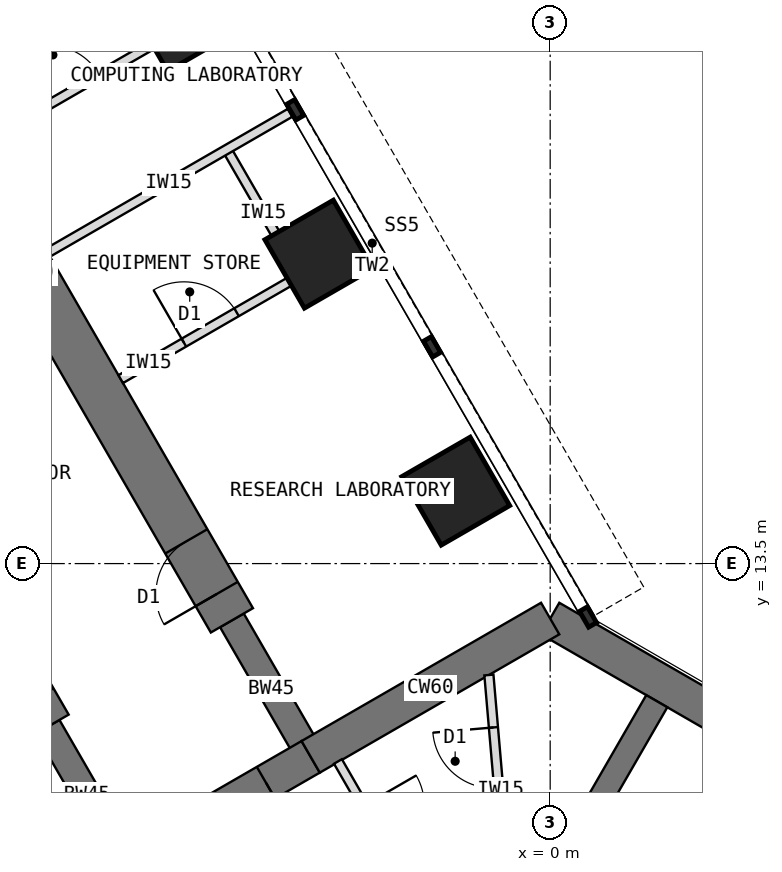
"""IFC4 building model, lengths in metres.
Left out: names, types, materials, properties, quantities, classifications, styles, units other than length and angle.
Written with IfcOpenShell. Run it as: python <this file> out.ifc"""

import sys

from ifc_helpers import new_model, si_unit, direction, frame, frame_2d, origin, origin_2d, place, context, subcontext, project, spatial, rectangle, extrude, element, fill, save


model = new_model("IFC4")
c1 = context("Model", 3, precision=1e-05, world=origin(), true_north=direction((0.0, 1.0)))
c2 = subcontext(c1, "Body", "Model", "MODEL_VIEW")
j1 = project(units=[si_unit("LENGTHUNIT", "METRE"), si_unit("PLANEANGLEUNIT", "RADIAN")], contexts=[c1])
p1 = place(None, origin())
s1 = spatial("IfcSite", under=j1, at=p1, CompositionType="ELEMENT")
p2 = place(p1, origin())
s2 = spatial("IfcBuilding", under=s1, at=p2, CompositionType="ELEMENT")
p3 = place(p2, frame((0.0, 0.0, 133.5)))
s3 = spatial("IfcBuildingStorey", under=s2, at=p3, CompositionType="ELEMENT", Elevation=133.5)
p4 = place(p3, frame((10.908, 6.298, 0.0), z_axis=(0.0, 0.0, 1.0), x_axis=(-0.866021940709, 0.500005998175, 0.0)))
e1 = element("IfcWall", 1, at=p4, inside=s3, PredefinedType="SHEAR", context=c2, shape_type="SweptSolid", body=[
    extrude(rectangle(XDim=12.596, YDim=0.6, at=frame_2d((6.298, 0.0))), origin(), (0.0, 0.0, 1.0), 4.0),
])
p5 = place(p3, frame((0.0, 12.596, 0.0), z_axis=(0.0, 0.0, 1.0), x_axis=(-0.866011268655, -0.500024481964, 0.0)))
e2 = element("IfcWall", 2, at=p5, inside=s3, PredefinedType="SHEAR", context=c2, shape_type="SweptSolid", body=[
    extrude(rectangle(XDim=4.548, YDim=0.6, at=frame_2d((2.274, 0.0))), origin(), (0.0, 0.0, 1.0), 4.0),
])
p6 = place(p3, frame((-3.939, 10.322, 0.0), z_axis=(0.0, 0.0, 1.0), x_axis=(-0.866019471182, -0.500010275428, 0.0)))
e3 = element("IfcWall", 3, at=p6, inside=s3, PredefinedType="SHEAR", context=c2, shape_type="SweptSolid", body=[
    extrude(rectangle(XDim=3.5, YDim=0.6, at=frame_2d((1.75, 0.0))), origin(), (0.0, 0.0, 1.0), 4.0),
])
p7 = place(p6, frame((0.85, 0.0, 0.0)))
e4 = element("IfcOpeningElement", 4, at=p7, cuts=e3, PredefinedType="OPENING", context=c2, shape_type="SweptSolid", body=[
    extrude(rectangle(XDim=1.8, YDim=2.1, at=frame_2d((0.9, 1.05))), frame((0.0, 0.31, 0.0), z_axis=(0.0, -1.0, 0.0), x_axis=(1.0, 0.0, 0.0)), (0.0, 0.0, 1.0), 0.62),
])
p8 = place(p3, frame((-6.97, 8.572, 0.0), z_axis=(0.0, 0.0, 1.0), x_axis=(-0.499988811324, 0.866031863473, 0.0)))
e5 = element("IfcWall", 5, at=p8, inside=s3, PredefinedType="SHEAR", context=c2, shape_type="SweptSolid", body=[
    extrude(rectangle(XDim=2.592, YDim=0.45, at=frame_2d((1.296, 0.0))), origin(), (0.0, 0.0, 1.0), 4.0),
])
p9 = place(p3, frame((-8.266, 10.816, 0.0), z_axis=(0.0, 0.0, 1.0), x_axis=(-0.499996231654, 0.866027579429, 0.0)))
e6 = element("IfcWall", 6, at=p9, inside=s3, PredefinedType="SHEAR", context=c2, shape_type="SweptSolid", body=[
    extrude(rectangle(XDim=13.2, YDim=0.8, at=frame_2d((6.6, 0.0))), origin(), (0.0, 0.0, 1.0), 4.0),
])
p10 = place(p9, frame((0.5, 0.0, 0.0)))
e7 = element("IfcOpeningElement", 7, at=p10, cuts=e6, PredefinedType="OPENING", context=c2, shape_type="SweptSolid", body=[
    extrude(rectangle(XDim=1.0, YDim=2.1, at=frame_2d((0.5, 1.05))), frame((0.0, 0.41, 0.0), z_axis=(0.0, -1.0, 0.0), x_axis=(1.0, 0.0, 0.0)), (0.0, 0.0, 1.0), 0.82),
])
p11 = place(p9, frame((7.25, 0.0, 0.0)))
e8 = element("IfcOpeningElement", 8, at=p11, cuts=e6, PredefinedType="OPENING", context=c2, shape_type="SweptSolid", body=[
    extrude(rectangle(XDim=1.0, YDim=2.1, at=frame_2d((0.5, 1.05))), frame((0.0, 0.41, 0.0), z_axis=(0.0, -1.0, 0.0), x_axis=(1.0, 0.0, 0.0)), (0.0, 0.0, 1.0), 0.82),
])
p12 = place(p3, frame((-3.939, 10.322, 0.0), z_axis=(0.0, 0.0, 1.0), x_axis=(-0.499918158782, 0.866072649678, 0.0)))
e9 = element("IfcWall", 9, at=p12, inside=s3, PredefinedType="SHEAR", context=c2, shape_type="SweptSolid", body=[
    extrude(rectangle(XDim=2.592, YDim=0.45, at=frame_2d((1.296, 0.0))), origin(), (0.0, 0.0, 1.0), 4.0),
])
p13 = place(p3, frame((-5.234, 12.566, 0.0), z_axis=(0.0, 0.0, 1.0), x_axis=(-0.500010103361, 0.866019570528, 0.0)))
e10 = element("IfcWall", 10, at=p13, inside=s3, PredefinedType="SHEAR", context=c2, shape_type="SweptSolid", body=[
    extrude(rectangle(XDim=13.2, YDim=0.8, at=frame_2d((6.6, 0.0))), origin(), (0.0, 0.0, 1.0), 4.0),
])
p14 = place(p13, frame((0.5, 0.0, 0.0)))
e11 = element("IfcOpeningElement", 11, at=p14, cuts=e10, PredefinedType="OPENING", context=c2, shape_type="SweptSolid", body=[
    extrude(rectangle(XDim=1.0, YDim=2.1, at=frame_2d((0.5, 1.05))), frame((0.0, 0.41, 0.0), z_axis=(0.0, -1.0, 0.0), x_axis=(1.0, 0.0, 0.0)), (0.0, 0.0, 1.0), 0.82),
])
p15 = place(p13, frame((7.25, 0.0, 0.0)))
e12 = element("IfcOpeningElement", 12, at=p15, cuts=e10, PredefinedType="OPENING", context=c2, shape_type="SweptSolid", body=[
    extrude(rectangle(XDim=1.0, YDim=2.1, at=frame_2d((0.5, 1.05))), frame((0.0, 0.41, 0.0), z_axis=(0.0, -1.0, 0.0), x_axis=(1.0, 0.0, 0.0)), (0.0, 0.0, 1.0), 0.82),
])
for number, where, z_axis, x_axis in (
    (13, (-1.554, 14.691, 0.0), (0.0, 0.0, 1.0), (0.866, 0.5, 0.0)),
    (14, (-3.804, 18.588, 0.0), (0.0, 0.0, 1.0), (0.866, 0.5, 0.0)),
    (15, (-6.054, 22.486, 0.0), (0.0, 0.0, 1.0), (0.866, 0.5, 0.0)),
):
    element("IfcColumn", number, at=place(p3, frame(where, z_axis=z_axis, x_axis=x_axis)), inside=s3, PredefinedType="COLUMN", context=c2, shape_type="SweptSolid", body=[
        extrude(rectangle(XDim=1.3, YDim=1.3, at=origin_2d()), origin(), (0.0, 0.0, 1.0), 4.0),
    ])
p16 = place(p3, frame((-1.201, 6.12, 0.0), z_axis=(0.0, 0.0, 1.0), x_axis=(0.49999668571, 0.866027317282, 0.0)))
e16 = element("IfcWall", 16, at=p16, inside=s3, PredefinedType="SHEAR", context=c2, shape_type="SweptSolid", body=[
    extrude(rectangle(XDim=5.908, YDim=0.4, at=frame_2d((2.954, 0.0))), origin(), (0.0, 0.0, 1.0), 4.0),
])
p17 = place(p3, frame((-8.263, 18.612, 0.0), z_axis=(0.0, 0.0, 1.0), x_axis=(0.866016770315, 0.500014953309, 0.0)))
e17 = element("IfcWall", 17, at=p17, inside=s3, PredefinedType="PARTITIONING", context=c2, shape_type="SweptSolid", body=[
    extrude(rectangle(XDim=4.6, YDim=0.15, at=frame_2d((2.3, 0.0))), origin(), (0.0, 0.0, 1.0), 3.8),
])
p18 = place(p3, frame((-4.119, 18.234, 0.0), z_axis=(0.0, 0.0, 1.0), x_axis=(-0.500001309137, 0.866024647952, 0.0)))
e18 = element("IfcWall", 18, at=p18, inside=s3, PredefinedType="PARTITIONING", context=c2, shape_type="SweptSolid", body=[
    extrude(rectangle(XDim=2.4, YDim=0.15, at=frame_2d((1.2, 0.0))), origin(), (0.0, 0.0, 1.0), 3.8),
])
p19 = place(p3, frame((-7.063, 16.533, 0.0), z_axis=(0.0, 0.0, 1.0), x_axis=(0.865989465428, 0.500062241894, 0.0)))
e19 = element("IfcWall", 19, at=p19, inside=s3, PredefinedType="PARTITIONING", context=c2, shape_type="SweptSolid", body=[
    extrude(rectangle(XDim=3.4, YDim=0.15, at=frame_2d((1.7, 0.0))), origin(), (0.0, 0.0, 1.0), 3.8),
])
p20 = place(p19, frame((1.2, 0.0, 0.0)))
e20 = element("IfcOpeningElement", 20, at=p20, cuts=e19, PredefinedType="OPENING", context=c2, shape_type="SweptSolid", body=[
    extrude(rectangle(XDim=1.0, YDim=2.1, at=frame_2d((0.5, 1.05))), frame((0.0, 0.085, 0.0), z_axis=(0.0, -1.0, 0.0), x_axis=(1.0, 0.0, 0.0)), (0.0, 0.0, 1.0), 0.17),
])
p21 = place(p3, frame((-9.313, 20.431, 0.0), z_axis=(0.0, 0.0, 1.0), x_axis=(0.866020560687, 0.500008388397, 0.0)))
e21 = element("IfcWall", 21, at=p21, inside=s3, PredefinedType="PARTITIONING", context=c2, shape_type="SweptSolid", body=[
    extrude(rectangle(XDim=3.4, YDim=0.15, at=frame_2d((1.7, 0.0))), origin(), (0.0, 0.0, 1.0), 3.8),
])
p22 = place(p21, frame((1.2, 0.0, 0.0)))
e22 = element("IfcOpeningElement", 22, at=p22, cuts=e21, PredefinedType="OPENING", context=c2, shape_type="SweptSolid", body=[
    extrude(rectangle(XDim=1.0, YDim=2.1, at=frame_2d((0.5, 1.05))), frame((0.0, 0.085, 0.0), z_axis=(0.0, -1.0, 0.0), x_axis=(1.0, 0.0, 0.0)), (0.0, 0.0, 1.0), 0.17),
])
p23 = place(p3, frame((-3.49, 10.246, 0.0), z_axis=(0.0, 0.0, 1.0), x_axis=(0.499999473313, -0.866025707867, 0.0)))
e23 = element("IfcWall", 23, at=p23, inside=s3, PredefinedType="PARTITIONING", context=c2, shape_type="SweptSolid", body=[
    extrude(rectangle(XDim=4.476, YDim=0.15, at=frame_2d((2.238, 0.0))), origin(), (0.0, 0.0, 1.0), 3.8),
])
p24 = place(p23, frame((0.843, 0.0, 0.0)))
e24 = element("IfcOpeningElement", 24, at=p24, cuts=e23, PredefinedType="OPENING", context=c2, shape_type="SweptSolid", body=[
    extrude(rectangle(XDim=1.0, YDim=2.1, at=frame_2d((0.5, 1.05))), frame((0.0, 0.085, 0.0), z_axis=(0.0, -1.0, 0.0), x_axis=(1.0, 0.0, 0.0)), (0.0, 0.0, 1.0), 0.17),
])
p25 = place(p3, frame((-0.616, 7.133, 0.0), z_axis=(0.0, 0.0, 1.0), x_axis=(-0.086041653535, 0.996291540593, 0.0)))
e25 = element("IfcWall", 25, at=p25, inside=s3, PredefinedType="PARTITIONING", context=c2, shape_type="SweptSolid", body=[
    extrude(rectangle(XDim=4.551, YDim=0.15, at=frame_2d((2.276, 0.0))), origin(), (0.0, 0.0, 1.0), 3.8),
])
p26 = place(p25, frame((2.686, 0.0, 0.0)))
e26 = element("IfcOpeningElement", 26, at=p26, cuts=e25, PredefinedType="OPENING", context=c2, shape_type="SweptSolid", body=[
    extrude(rectangle(XDim=1.0, YDim=2.1, at=frame_2d((0.5, 1.05))), frame((0.0, 0.085, 0.0), z_axis=(0.0, -1.0, 0.0), x_axis=(1.0, 0.0, 0.0)), (0.0, 0.0, 1.0), 0.17),
])
p27 = place(p7, origin())
e27 = element("IfcDoor", 27, at=p27, inside=s3, OperationType="DOUBLE_DOOR_DOUBLE_SWING", PredefinedType="DOOR", context=c2, shape_type="SweptSolid", body=[
    extrude(rectangle(XDim=1.72, YDim=2.06, at=frame_2d((0.9, 1.03))), frame((0.0, 0.025, 0.0), z_axis=(0.0, -1.0, 0.0), x_axis=(1.0, 0.0, 0.0)), (0.0, 0.0, 1.0), 0.05),
    extrude(rectangle(XDim=0.04, YDim=2.1, at=frame_2d((0.02, 1.05))), frame((0.0, 0.3, 0.0), z_axis=(0.0, -1.0, 0.0), x_axis=(1.0, 0.0, 0.0)), (0.0, 0.0, 1.0), 0.6),
    extrude(rectangle(XDim=0.04, YDim=2.1, at=frame_2d((1.78, 1.05))), frame((0.0, 0.3, 0.0), z_axis=(0.0, -1.0, 0.0), x_axis=(1.0, 0.0, 0.0)), (0.0, 0.0, 1.0), 0.6),
    extrude(rectangle(XDim=1.72, YDim=0.04, at=frame_2d((0.9, 2.08))), frame((0.0, 0.3, 0.0), z_axis=(0.0, -1.0, 0.0), x_axis=(1.0, 0.0, 0.0)), (0.0, 0.0, 1.0), 0.6),
])
fill(e4, e27)
p28 = place(p20, origin())
e28 = element("IfcDoor", 28, at=p28, inside=s3, OperationType="SINGLE_SWING_LEFT", PredefinedType="DOOR", context=c2, shape_type="SweptSolid", body=[
    extrude(rectangle(XDim=1.0, YDim=2.1, at=frame_2d((0.5, 1.05))), frame((0.0, 0.025, 0.0), z_axis=(0.0, -1.0, 0.0), x_axis=(1.0, 0.0, 0.0)), (0.0, 0.0, 1.0), 0.05),
])
fill(e20, e28)
p29 = place(p22, origin())
e29 = element("IfcDoor", 29, at=p29, inside=s3, OperationType="SINGLE_SWING_LEFT", PredefinedType="DOOR", context=c2, shape_type="SweptSolid", body=[
    extrude(rectangle(XDim=1.0, YDim=2.1, at=frame_2d((0.5, 1.05))), frame((0.0, 0.025, 0.0), z_axis=(0.0, -1.0, 0.0), x_axis=(1.0, 0.0, 0.0)), (0.0, 0.0, 1.0), 0.05),
])
fill(e22, e29)
p30 = place(p26, origin())
e30 = element("IfcDoor", 30, at=p30, inside=s3, OperationType="SINGLE_SWING_RIGHT", PredefinedType="DOOR", context=c2, shape_type="SweptSolid", body=[
    extrude(rectangle(XDim=1.0, YDim=2.1, at=frame_2d((0.5, 1.05))), frame((0.0, 0.025, 0.0), z_axis=(0.0, -1.0, 0.0), x_axis=(1.0, 0.0, 0.0)), (0.0, 0.0, 1.0), 0.05),
])
fill(e26, e30)
p31 = place(p10, origin())
e31 = element("IfcDoor", 31, at=p31, inside=s3, OperationType="SINGLE_SWING_LEFT", PredefinedType="DOOR", context=c2, shape_type="SweptSolid", body=[
    extrude(rectangle(XDim=0.92, YDim=2.06, at=frame_2d((0.5, 1.03))), frame((0.0, 0.025, 0.0), z_axis=(0.0, -1.0, 0.0), x_axis=(1.0, 0.0, 0.0)), (0.0, 0.0, 1.0), 0.05),
    extrude(rectangle(XDim=0.04, YDim=2.1, at=frame_2d((0.02, 1.05))), frame((0.0, 0.4, 0.0), z_axis=(0.0, -1.0, 0.0), x_axis=(1.0, 0.0, 0.0)), (0.0, 0.0, 1.0), 0.8),
    extrude(rectangle(XDim=0.04, YDim=2.1, at=frame_2d((0.98, 1.05))), frame((0.0, 0.4, 0.0), z_axis=(0.0, -1.0, 0.0), x_axis=(1.0, 0.0, 0.0)), (0.0, 0.0, 1.0), 0.8),
    extrude(rectangle(XDim=0.92, YDim=0.04, at=frame_2d((0.5, 2.08))), frame((0.0, 0.4, 0.0), z_axis=(0.0, -1.0, 0.0), x_axis=(1.0, 0.0, 0.0)), (0.0, 0.0, 1.0), 0.8),
])
fill(e7, e31)
p32 = place(p14, origin())
e32 = element("IfcDoor", 32, at=p32, inside=s3, OperationType="SINGLE_SWING_LEFT", PredefinedType="DOOR", context=c2, shape_type="SweptSolid", body=[
    extrude(rectangle(XDim=0.92, YDim=2.06, at=frame_2d((0.5, 1.03))), frame((0.0, 0.025, 0.0), z_axis=(0.0, -1.0, 0.0), x_axis=(1.0, 0.0, 0.0)), (0.0, 0.0, 1.0), 0.05),
    extrude(rectangle(XDim=0.04, YDim=2.1, at=frame_2d((0.02, 1.05))), frame((0.0, 0.4, 0.0), z_axis=(0.0, -1.0, 0.0), x_axis=(1.0, 0.0, 0.0)), (0.0, 0.0, 1.0), 0.8),
    extrude(rectangle(XDim=0.04, YDim=2.1, at=frame_2d((0.98, 1.05))), frame((0.0, 0.4, 0.0), z_axis=(0.0, -1.0, 0.0), x_axis=(1.0, 0.0, 0.0)), (0.0, 0.0, 1.0), 0.8),
    extrude(rectangle(XDim=0.92, YDim=0.04, at=frame_2d((0.5, 2.08))), frame((0.0, 0.4, 0.0), z_axis=(0.0, -1.0, 0.0), x_axis=(1.0, 0.0, 0.0)), (0.0, 0.0, 1.0), 0.8),
])
fill(e11, e32)
save(model, sys.argv[1])
